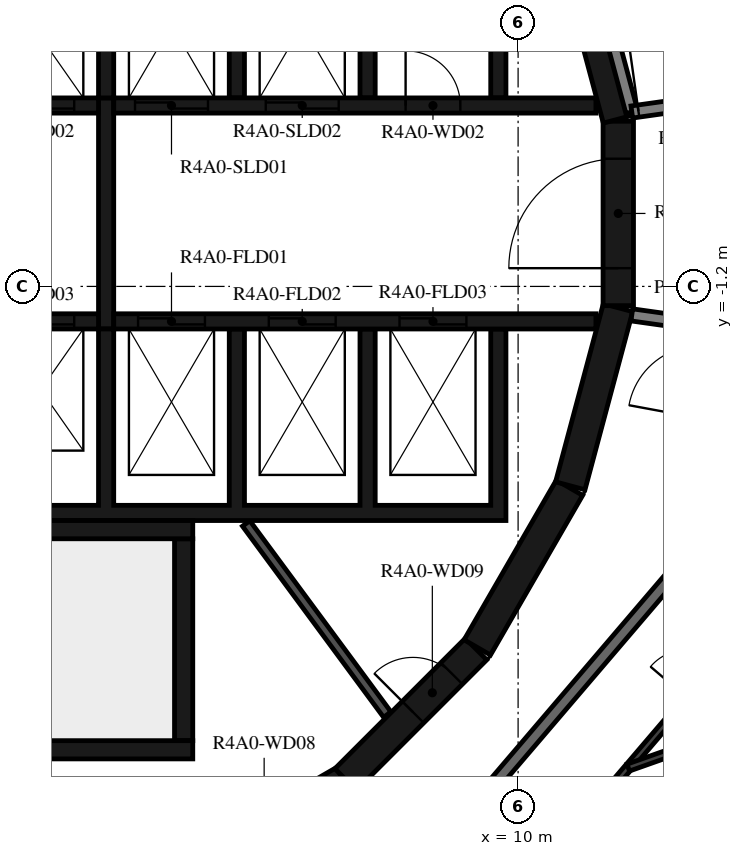
"""IFC4 building model, lengths in metres.
Left out: names, types, materials, properties, quantities, classifications, styles, units other than length and angle.
Written with IfcOpenShell. Run it as: python <this file> out.ifc"""

import sys

from ifc_helpers import new_model, si_unit, direction, frame, frame_2d, origin, place, context, subcontext, project, spatial, polyline, rectangle, outline, extrude, element, fill, save


model = new_model("IFC4")
c1 = context("Model", 3, precision=1e-05, world=origin(), true_north=direction((0.0, 1.0)))
c2 = subcontext(c1, "Body", "Model", "MODEL_VIEW")
j1 = project(units=[si_unit("LENGTHUNIT", "METRE"), si_unit("PLANEANGLEUNIT", "RADIAN")], contexts=[c1])
p1 = place(None, origin())
s1 = spatial("IfcSite", under=j1, at=p1, CompositionType="ELEMENT")
p2 = place(p1, origin())
s2 = spatial("IfcBuilding", under=s1, at=p2, CompositionType="ELEMENT")
p3 = place(p2, frame((0.0, 0.0, 158.7)))
s3 = spatial("IfcBuildingStorey", under=s2, at=p3, CompositionType="ELEMENT", Elevation=158.7)
p4 = place(p3, frame((4.51, -10.845, 0.0), z_axis=(0.0, 0.0, 1.0), x_axis=(0.865975092491, 0.500087131594, 0.0)))
e1 = element("IfcWall", 1, at=p4, inside=s3, PredefinedType="SHEAR", context=c2, shape_type="SweptSolid", body=[
    extrude(rectangle(XDim=3.033, YDim=0.5, at=frame_2d((1.516, 0.0))), origin(), (0.0, 0.0, 1.0), 3.12),
])
p5 = place(p4, frame((1.066, 0.0, 0.0)))
e2 = element("IfcOpeningElement", 2, at=p5, cuts=e1, PredefinedType="OPENING", context=c2, shape_type="SweptSolid", body=[
    extrude(rectangle(XDim=0.9, YDim=2.1, at=frame_2d((0.45, 1.05))), frame((0.0, 0.26, 0.0), z_axis=(0.0, -1.0, 0.0), x_axis=(1.0, 0.0, 0.0)), (0.0, 0.0, 1.0), 0.52),
])
p6 = place(p3, frame((7.164, -9.308, 0.0), z_axis=(0.0, 0.0, 1.0), x_axis=(0.707106781187, 0.707106781187, 0.0)))
e3 = element("IfcWall", 3, at=p6, inside=s3, PredefinedType="SHEAR", context=c2, shape_type="SweptSolid", body=[
    extrude(rectangle(XDim=3.032, YDim=0.5, at=frame_2d((1.516, 0.0))), origin(), (0.0, 0.0, 1.0), 3.12),
])
p7 = place(p6, frame((1.566, 0.0, 0.0)))
e4 = element("IfcOpeningElement", 4, at=p7, cuts=e3, PredefinedType="OPENING", context=c2, shape_type="SweptSolid", body=[
    extrude(rectangle(XDim=0.9, YDim=2.1, at=frame_2d((0.45, 1.05))), frame((0.0, 0.26, 0.0), z_axis=(0.0, -1.0, 0.0), x_axis=(1.0, 0.0, 0.0)), (0.0, 0.0, 1.0), 0.52),
])
for number, where, z_axis, x_axis in (
    (5, (9.329, -7.137, 0.0), (0.0, 0.0, 1.0), (0.5, 0.866, 0.0)),
    (6, (10.858, -4.479, 0.0), (0.0, 0.0, 1.0), (0.259, 0.966, 0.0)),
):
    element("IfcWall", number, at=place(p3, frame(where, z_axis=z_axis, x_axis=x_axis)), inside=s3, PredefinedType="SHEAR", context=c2, shape_type="SweptSolid", body=[
        extrude(rectangle(XDim=3.033, YDim=0.5, at=frame_2d((1.516, 0.0))), origin(), (0.0, 0.0, 1.0), 3.12),
    ])
p8 = place(p3, frame((11.647, -1.516, 0.0), z_axis=(0.0, 0.0, 1.0), x_axis=(0.0, 1.0, 0.0)))
e7 = element("IfcWall", 7, at=p8, inside=s3, PredefinedType="SHEAR", context=c2, shape_type="SweptSolid", body=[
    extrude(rectangle(XDim=3.033, YDim=0.5, at=frame_2d((1.516, 0.0))), origin(), (0.0, 0.0, 1.0), 3.12),
])
p9 = place(p8, frame((0.616, 0.0, 0.0)))
e8 = element("IfcOpeningElement", 8, at=p9, cuts=e7, PredefinedType="OPENING", context=c2, shape_type="SweptSolid", body=[
    extrude(rectangle(XDim=1.8, YDim=2.1, at=frame_2d((0.9, 1.05))), frame((0.0, 0.26, 0.0), z_axis=(0.0, -1.0, 0.0), x_axis=(1.0, 0.0, 0.0)), (0.0, 0.0, 1.0), 0.52),
])
p10 = place(p3, frame((11.643, 1.55, 0.0), z_axis=(0.0, 0.0, 1.0), x_axis=(-0.258734743916, 0.965948410781, 0.0)))
e9 = element("IfcWall", 9, at=p10, inside=s3, PredefinedType="SHEAR", context=c2, shape_type="SweptSolid", body=[
    extrude(rectangle(XDim=3.033, YDim=0.5, at=frame_2d((1.516, 0.0))), origin(), (0.0, 0.0, 1.0), 3.12),
])
p11 = place(p3, frame((-2.4, -5.2, 0.0), z_axis=(0.0, 0.0, 1.0), x_axis=(1.0, 0.0, 0.0)))
e10 = element("IfcWall", 10, at=p11, inside=s3, PredefinedType="SHEAR", context=c2, shape_type="SweptSolid", body=[
    extrude(rectangle(XDim=7.05, YDim=0.3, at=frame_2d((3.525, 0.0))), origin(), (0.0, 0.0, 1.0), 3.12),
])
p12 = place(p3, frame((4.5, -8.67, 0.0), z_axis=(0.0, 0.0, 1.0), x_axis=(0.0, 1.0, 0.0)))
e11 = element("IfcWall", 11, at=p12, inside=s3, PredefinedType="SHEAR", context=c2, shape_type="SweptSolid", body=[
    extrude(rectangle(XDim=3.32, YDim=0.3, at=frame_2d((1.66, 0.0))), origin(), (0.0, 0.0, 1.0), 3.12),
])
p13 = place(p3, frame((0.1, -8.82, 0.0), z_axis=(0.0, 0.0, 1.0), x_axis=(1.0, 0.0, 0.0)))
e12 = element("IfcWall", 12, at=p13, inside=s3, PredefinedType="SHEAR", context=c2, shape_type="SweptSolid", body=[
    extrude(rectangle(XDim=4.55, YDim=0.3, at=frame_2d((2.275, 0.0))), origin(), (0.0, 0.0, 1.0), 3.12),
])
p14 = place(p3, origin())
e13 = element("IfcWall", 13, at=p14, inside=s3, PredefinedType="SHEAR", context=c2, shape_type="SweptSolid", body=[
    extrude(outline(polyline([(-9.55, 4.8), (-1.2, 4.8), (-1.2, 1.9), (-0.95, 1.9), (-0.95, 4.8), (0.95, 4.8), (0.95, 1.9), (1.2, 1.9), (1.2, 4.8), (3.1, 4.8), (3.1, 1.9), (3.35, 1.9), (3.35, 4.8), (5.25, 4.8), (5.25, 1.9), (5.5, 1.9), (5.5, 4.8), (7.4, 4.8), (7.4, 1.9), (7.65, 1.9), (7.65, 4.8), (9.55, 4.8), (9.55, 1.9), (9.8, 1.9), (9.8, 4.8), (9.8, 5.05), (-9.8, 5.05), (-9.8, 4.8), (-9.8, 1.9), (-9.55, 1.9), (-9.55, 4.8)])), origin(), (0.0, 0.0, 1.0), 3.12),
])
p15 = place(p3, origin())
e14 = element("IfcWall", 14, at=p15, inside=s3, PredefinedType="SHEAR", context=c2, shape_type="SweptSolid", body=[
    extrude(outline(polyline([(9.8, -5.05), (9.8, -4.8), (9.8, -1.9), (9.55, -1.9), (9.55, -4.8), (7.65, -4.8), (7.65, -1.9), (7.4, -1.9), (7.4, -4.8), (5.5, -4.8), (5.5, -1.9), (5.25, -1.9), (5.25, -4.8), (3.35, -4.8), (3.35, -1.9), (3.1, -1.9), (3.1, -4.8), (1.2, -4.8), (1.2, -1.9), (0.95, -1.9), (0.95, -4.8), (-0.95, -4.8), (-0.95, -1.9), (-1.2, -1.9), (-1.2, -4.8), (-3.1, -4.8), (-3.1, -1.9), (-3.35, -1.9), (-3.35, -4.8), (-5.25, -4.8), (-5.25, -1.9), (-5.5, -1.9), (-5.5, -4.8), (-7.4, -4.8), (-7.4, -1.9), (-7.65, -1.9), (-7.65, -4.8), (-9.55, -4.8), (-9.55, -1.9), (-9.8, -1.9), (-9.8, -4.8), (-9.8, -5.05), (9.8, -5.05)])), origin(), (0.0, 0.0, 1.0), 3.12),
])
p16 = place(p3, frame((-11.28, 1.775, 0.0), z_axis=(0.0, 0.0, 1.0), x_axis=(1.0, 0.0, 0.0)))
e15 = element("IfcWall", 15, at=p16, inside=s3, PredefinedType="SHEAR", context=c2, shape_type="SweptSolid", body=[
    extrude(rectangle(XDim=14.38, YDim=0.25, at=frame_2d((7.19, 0.0))), origin(), (0.0, 0.0, 1.0), 3.12),
])
p17 = place(p16, frame((10.73, 0.0, 0.0)))
e16 = element("IfcOpeningElement", 16, at=p17, cuts=e15, PredefinedType="OPENING", context=c2, shape_type="SweptSolid", body=[
    extrude(rectangle(XDim=1.1, YDim=2.1, at=frame_2d((0.55, 1.05))), frame((0.0, 0.135, 0.0), z_axis=(0.0, -1.0, 0.0), x_axis=(1.0, 0.0, 0.0)), (0.0, 0.0, 1.0), 0.27),
])
p18 = place(p16, frame((12.88, 0.0, 0.0)))
e17 = element("IfcOpeningElement", 17, at=p18, cuts=e15, PredefinedType="OPENING", context=c2, shape_type="SweptSolid", body=[
    extrude(rectangle(XDim=1.1, YDim=2.1, at=frame_2d((0.55, 1.05))), frame((0.0, 0.135, 0.0), z_axis=(0.0, -1.0, 0.0), x_axis=(1.0, 0.0, 0.0)), (0.0, 0.0, 1.0), 0.27),
])
p19 = place(p16, frame((5.455, 0.0, 0.0)))
e18 = element("IfcOpeningElement", 18, at=p19, cuts=e15, PredefinedType="OPENING", context=c2, shape_type="SweptSolid", body=[
    extrude(rectangle(XDim=0.9, YDim=2.1, at=frame_2d((0.45, 1.05))), frame((0.0, 0.135, 0.0), z_axis=(0.0, -1.0, 0.0), x_axis=(1.0, 0.0, 0.0)), (0.0, 0.0, 1.0), 0.27),
])
p20 = place(p3, frame((3.35, 1.775, 0.0), z_axis=(0.0, 0.0, 1.0), x_axis=(1.0, 0.0, 0.0)))
e19 = element("IfcWall", 19, at=p20, inside=s3, PredefinedType="SHEAR", context=c2, shape_type="SweptSolid", body=[
    extrude(rectangle(XDim=7.93, YDim=0.25, at=frame_2d((3.965, 0.0))), origin(), (0.0, 0.0, 1.0), 3.12),
])
p21 = place(p20, frame((0.35, 0.0, 0.0)))
e20 = element("IfcOpeningElement", 20, at=p21, cuts=e19, PredefinedType="OPENING", context=c2, shape_type="SweptSolid", body=[
    extrude(rectangle(XDim=1.2, YDim=2.4, at=frame_2d((0.6, 1.2))), frame((0.0, 0.135, 0.0), z_axis=(0.0, -1.0, 0.0), x_axis=(1.0, 0.0, 0.0)), (0.0, 0.0, 1.0), 0.27),
])
p22 = place(p20, frame((2.5, 0.0, 0.0)))
e21 = element("IfcOpeningElement", 21, at=p22, cuts=e19, PredefinedType="OPENING", context=c2, shape_type="SweptSolid", body=[
    extrude(rectangle(XDim=1.2, YDim=2.4, at=frame_2d((0.6, 1.2))), frame((0.0, 0.135, 0.0), z_axis=(0.0, -1.0, 0.0), x_axis=(1.0, 0.0, 0.0)), (0.0, 0.0, 1.0), 0.27),
])
p23 = place(p20, frame((4.8, 0.0, 0.0)))
e22 = element("IfcOpeningElement", 22, at=p23, cuts=e19, PredefinedType="OPENING", context=c2, shape_type="SweptSolid", body=[
    extrude(rectangle(XDim=0.9, YDim=2.1, at=frame_2d((0.45, 1.05))), frame((0.0, 0.135, 0.0), z_axis=(0.0, -1.0, 0.0), x_axis=(1.0, 0.0, 0.0)), (0.0, 0.0, 1.0), 0.27),
])
p24 = place(p3, frame((-11.28, -1.775, 0.0), z_axis=(0.0, 0.0, 1.0), x_axis=(1.0, 0.0, 0.0)))
e23 = element("IfcWall", 23, at=p24, inside=s3, PredefinedType="SHEAR", context=c2, shape_type="SweptSolid", body=[
    extrude(rectangle(XDim=14.38, YDim=0.25, at=frame_2d((7.19, 0.0))), origin(), (0.0, 0.0, 1.0), 3.12),
])
p25 = place(p24, frame((2.03, 0.0, 0.0)))
e24 = element("IfcOpeningElement", 24, at=p25, cuts=e23, PredefinedType="OPENING", context=c2, shape_type="SweptSolid", body=[
    extrude(rectangle(XDim=1.3, YDim=2.1, at=frame_2d((0.65, 1.05))), frame((0.0, 0.135, 0.0), z_axis=(0.0, -1.0, 0.0), x_axis=(1.0, 0.0, 0.0)), (0.0, 0.0, 1.0), 0.27),
])
p26 = place(p24, frame((4.18, 0.0, 0.0)))
e25 = element("IfcOpeningElement", 25, at=p26, cuts=e23, PredefinedType="OPENING", context=c2, shape_type="SweptSolid", body=[
    extrude(rectangle(XDim=1.3, YDim=2.1, at=frame_2d((0.65, 1.05))), frame((0.0, 0.135, 0.0), z_axis=(0.0, -1.0, 0.0), x_axis=(1.0, 0.0, 0.0)), (0.0, 0.0, 1.0), 0.27),
])
p27 = place(p24, frame((12.88, 0.0, 0.0)))
e26 = element("IfcOpeningElement", 26, at=p27, cuts=e23, PredefinedType="OPENING", context=c2, shape_type="SweptSolid", body=[
    extrude(rectangle(XDim=1.1, YDim=2.1, at=frame_2d((0.55, 1.05))), frame((0.0, 0.135, 0.0), z_axis=(0.0, -1.0, 0.0), x_axis=(1.0, 0.0, 0.0)), (0.0, 0.0, 1.0), 0.27),
])
p28 = place(p24, frame((6.53, 0.0, 0.0)))
e27 = element("IfcOpeningElement", 27, at=p28, cuts=e23, PredefinedType="OPENING", context=c2, shape_type="SweptSolid", body=[
    extrude(rectangle(XDim=0.9, YDim=2.1, at=frame_2d((0.45, 1.05))), frame((0.0, 0.135, 0.0), z_axis=(0.0, -1.0, 0.0), x_axis=(1.0, 0.0, 0.0)), (0.0, 0.0, 1.0), 0.27),
])
p29 = place(p24, frame((8.68, 0.0, 0.0)))
e28 = element("IfcOpeningElement", 28, at=p29, cuts=e23, PredefinedType="OPENING", context=c2, shape_type="SweptSolid", body=[
    extrude(rectangle(XDim=0.9, YDim=2.1, at=frame_2d((0.45, 1.05))), frame((0.0, 0.135, 0.0), z_axis=(0.0, -1.0, 0.0), x_axis=(1.0, 0.0, 0.0)), (0.0, 0.0, 1.0), 0.27),
])
p30 = place(p24, frame((10.83, 0.0, 0.0)))
e29 = element("IfcOpeningElement", 29, at=p30, cuts=e23, PredefinedType="OPENING", context=c2, shape_type="SweptSolid", body=[
    extrude(rectangle(XDim=0.9, YDim=2.1, at=frame_2d((0.45, 1.05))), frame((0.0, 0.135, 0.0), z_axis=(0.0, -1.0, 0.0), x_axis=(1.0, 0.0, 0.0)), (0.0, 0.0, 1.0), 0.27),
])
p31 = place(p3, frame((3.35, -1.775, 0.0), z_axis=(0.0, 0.0, 1.0), x_axis=(1.0, 0.0, 0.0)))
e30 = element("IfcWall", 30, at=p31, inside=s3, PredefinedType="SHEAR", context=c2, shape_type="SweptSolid", body=[
    extrude(rectangle(XDim=7.93, YDim=0.25, at=frame_2d((3.965, 0.0))), origin(), (0.0, 0.0, 1.0), 3.12),
])
p32 = place(p31, frame((0.4, 0.0, 0.0)))
e31 = element("IfcOpeningElement", 31, at=p32, cuts=e30, PredefinedType="OPENING", context=c2, shape_type="SweptSolid", body=[
    extrude(rectangle(XDim=1.1, YDim=2.4, at=frame_2d((0.55, 1.2))), frame((0.0, 0.135, 0.0), z_axis=(0.0, -1.0, 0.0), x_axis=(1.0, 0.0, 0.0)), (0.0, 0.0, 1.0), 0.27),
])
p33 = place(p31, frame((2.55, 0.0, 0.0)))
e32 = element("IfcOpeningElement", 32, at=p33, cuts=e30, PredefinedType="OPENING", context=c2, shape_type="SweptSolid", body=[
    extrude(rectangle(XDim=1.1, YDim=2.4, at=frame_2d((0.55, 1.2))), frame((0.0, 0.135, 0.0), z_axis=(0.0, -1.0, 0.0), x_axis=(1.0, 0.0, 0.0)), (0.0, 0.0, 1.0), 0.27),
])
p34 = place(p31, frame((4.7, 0.0, 0.0)))
e33 = element("IfcOpeningElement", 33, at=p34, cuts=e30, PredefinedType="OPENING", context=c2, shape_type="SweptSolid", body=[
    extrude(rectangle(XDim=1.1, YDim=2.4, at=frame_2d((0.55, 1.2))), frame((0.0, 0.135, 0.0), z_axis=(0.0, -1.0, 0.0), x_axis=(1.0, 0.0, 0.0)), (0.0, 0.0, 1.0), 0.27),
])
p35 = place(p3, frame((3.225, -1.9, 0.0), z_axis=(0.0, 0.0, 1.0), x_axis=(0.0, 1.0, 0.0)))
e34 = element("IfcWall", 34, at=p35, inside=s3, PredefinedType="SHEAR", context=c2, shape_type="SweptSolid", body=[
    extrude(rectangle(XDim=3.8, YDim=0.25, at=frame_2d((1.9, 0.0))), origin(), (0.0, 0.0, 1.0), 3.12),
])
p36 = place(p3, frame((5.528, -5.098, 0.0), z_axis=(0.0, 0.0, 1.0), x_axis=(0.594034318069, -0.804439698769, 0.0)))
e35 = element("IfcWall", 35, at=p36, inside=s3, PredefinedType="PARTITIONING", context=c2, shape_type="SweptSolid", body=[
    extrude(rectangle(XDim=3.907, YDim=0.15, at=frame_2d((1.953, 0.0))), origin(), (0.0, 0.0, 1.0), 3.12),
])
p37 = place(p3, frame((11.87, 1.668, 0.0), z_axis=(0.0, 0.0, 1.0), x_axis=(-0.258836880648, 0.965921047093, 0.0)))
e36 = element("IfcWall", 36, at=p37, inside=s3, PredefinedType="STANDARD", context=c2, shape_type="SweptSolid", body=[
    extrude(rectangle(XDim=1.695, YDim=0.2, at=frame_2d((0.848, 0.0))), origin(), (0.0, 0.0, 1.0), 3.12),
])
p38 = place(p3, frame((11.87, 1.668, 0.0), z_axis=(0.0, 0.0, 1.0), x_axis=(0.990270910415, 0.139152879904, 0.0)))
e37 = element("IfcWall", 37, at=p38, inside=s3, PredefinedType="STANDARD", context=c2, shape_type="SweptSolid", body=[
    extrude(rectangle(XDim=1.688, YDim=0.2, at=frame_2d((0.844, 0.0))), origin(), (0.0, 0.0, 1.0), 3.12),
])
p39 = place(p38, frame((0.11, 0.0, 0.0)))
e38 = element("IfcOpeningElement", 38, at=p39, cuts=e37, PredefinedType="OPENING", context=c2, shape_type="SweptSolid", body=[
    extrude(rectangle(XDim=1.2, YDim=2.1, at=frame_2d((0.6, 1.05))), frame((0.0, 0.11, 0.0), z_axis=(0.0, -1.0, 0.0), x_axis=(1.0, 0.0, 0.0)), (0.0, 0.0, 1.0), 0.22),
])
p40 = place(p3, frame((13.542, 1.903, 0.0), z_axis=(0.0, 0.0, 1.0), x_axis=(-0.333808508206, 0.942640907159, 0.0)))
e39 = element("IfcWall", 39, at=p40, inside=s3, PredefinedType="STANDARD", context=c2, shape_type="SweptSolid", body=[
    extrude(rectangle(XDim=6.317, YDim=0.2, at=frame_2d((3.158, 0.0))), origin(), (0.0, 0.0, 1.0), 3.12),
])
p41 = place(p3, frame((13.282, -1.867, 0.0), z_axis=(0.0, 0.0, 1.0), x_axis=(-0.990265430288, 0.139191873241, 0.0)))
e40 = element("IfcWall", 40, at=p41, inside=s3, PredefinedType="STANDARD", context=c2, shape_type="SweptSolid", body=[
    extrude(rectangle(XDim=1.426, YDim=0.2, at=frame_2d((0.713, 0.0))), origin(), (0.0, 0.0, 1.0), 3.12),
])
p42 = place(p3, frame((7.858, -11.433, 0.0), z_axis=(0.0, 0.0, 1.0), x_axis=(0.649440801937, 0.760412154545, 0.0)))
e41 = element("IfcWall", 41, at=p42, inside=s3, PredefinedType="STANDARD", context=c2, shape_type="SweptSolid", body=[
    extrude(rectangle(XDim=7.181, YDim=0.2, at=frame_2d((3.59, 0.0))), origin(), (0.0, 0.0, 1.0), 3.12),
])
p43 = place(p3, frame((8.737, -12.713, 0.0), z_axis=(0.0, 0.0, 1.0), x_axis=(0.649430604754, 0.760420863476, 0.0)))
e42 = element("IfcWall", 42, at=p43, inside=s3, PredefinedType="PARTITIONING", context=c2, shape_type="SweptSolid", body=[
    extrude(rectangle(XDim=7.985, YDim=0.12, at=frame_2d((3.992, 0.0))), origin(), (0.0, 0.0, 1.0), 3.12),
])
p44 = place(p43, frame((0.2, 0.0, 0.0)))
e43 = element("IfcOpeningElement", 43, at=p44, cuts=e42, PredefinedType="OPENING", context=c2, shape_type="SweptSolid", body=[
    extrude(rectangle(XDim=0.9, YDim=2.1, at=frame_2d((0.45, 1.05))), frame((0.0, 0.07, 0.0), z_axis=(0.0, -1.0, 0.0), x_axis=(1.0, 0.0, 0.0)), (0.0, 0.0, 1.0), 0.14),
])
p45 = place(p43, frame((6.234, 0.0, 0.0)))
e44 = element("IfcOpeningElement", 44, at=p45, cuts=e42, PredefinedType="OPENING", context=c2, shape_type="SweptSolid", body=[
    extrude(rectangle(XDim=0.8, YDim=2.1, at=frame_2d((0.4, 1.05))), frame((0.0, 0.07, 0.0), z_axis=(0.0, -1.0, 0.0), x_axis=(1.0, 0.0, 0.0)), (0.0, 0.0, 1.0), 0.14),
])
p46 = place(p3, frame((17.198, -7.206, 0.0), z_axis=(0.0, 0.0, 1.0), x_axis=(-0.942639551003, -0.333812337826, 0.0)))
e45 = element("IfcWall", 45, at=p46, inside=s3, PredefinedType="PARTITIONING", context=c2, shape_type="SweptSolid", body=[
    extrude(rectangle(XDim=5.713, YDim=0.12, at=frame_2d((2.857, 0.0))), origin(), (0.0, 0.0, 1.0), 3.12),
])
p47 = place(p9, origin())
e46 = element("IfcDoor", 46, at=p47, inside=s3, OperationType="DOUBLE_DOOR_SINGLE_SWING", PredefinedType="DOOR", context=c2, shape_type="SweptSolid", body=[
    extrude(rectangle(XDim=1.8, YDim=2.1, at=frame_2d((0.9, 1.05))), frame((0.0, 0.025, 0.0), z_axis=(0.0, -1.0, 0.0), x_axis=(1.0, 0.0, 0.0)), (0.0, 0.0, 1.0), 0.05),
])
fill(e8, e46)
p48 = place(p18, origin())
e47 = element("IfcDoor", 47, at=p48, inside=s3, OperationType="DOUBLE_DOOR_SLIDING", PredefinedType="DOOR", context=c2, shape_type="SweptSolid", body=[
    extrude(rectangle(XDim=1.1, YDim=2.1, at=frame_2d((0.55, 1.05))), frame((0.0, 0.025, 0.0), z_axis=(0.0, -1.0, 0.0), x_axis=(1.0, 0.0, 0.0)), (0.0, 0.0, 1.0), 0.05),
])
fill(e17, e47)
p49 = place(p21, origin())
e48 = element("IfcDoor", 48, at=p49, inside=s3, OperationType="DOUBLE_DOOR_SLIDING", PredefinedType="DOOR", context=c2, shape_type="SweptSolid", body=[
    extrude(rectangle(XDim=1.2, YDim=2.4, at=frame_2d((0.6, 1.2))), frame((0.0, 0.025, 0.0), z_axis=(0.0, -1.0, 0.0), x_axis=(1.0, 0.0, 0.0)), (0.0, 0.0, 1.0), 0.05),
])
fill(e20, e48)
p50 = place(p22, origin())
e49 = element("IfcDoor", 49, at=p50, inside=s3, OperationType="DOUBLE_DOOR_SLIDING", PredefinedType="DOOR", context=c2, shape_type="SweptSolid", body=[
    extrude(rectangle(XDim=1.2, YDim=2.4, at=frame_2d((0.6, 1.2))), frame((0.0, 0.025, 0.0), z_axis=(0.0, -1.0, 0.0), x_axis=(1.0, 0.0, 0.0)), (0.0, 0.0, 1.0), 0.05),
])
fill(e21, e49)
p51 = place(p27, origin())
e50 = element("IfcDoor", 50, at=p51, inside=s3, OperationType="DOUBLE_DOOR_SLIDING", PredefinedType="DOOR", context=c2, shape_type="SweptSolid", body=[
    extrude(rectangle(XDim=1.1, YDim=2.1, at=frame_2d((0.55, 1.05))), frame((0.0, 0.025, 0.0), z_axis=(0.0, -1.0, 0.0), x_axis=(1.0, 0.0, 0.0)), (0.0, 0.0, 1.0), 0.05),
])
fill(e26, e50)
p52 = place(p32, origin())
e51 = element("IfcDoor", 51, at=p52, inside=s3, OperationType="DOUBLE_DOOR_SLIDING", PredefinedType="DOOR", context=c2, shape_type="SweptSolid", body=[
    extrude(rectangle(XDim=1.1, YDim=2.4, at=frame_2d((0.55, 1.2))), frame((0.0, 0.025, 0.0), z_axis=(0.0, -1.0, 0.0), x_axis=(1.0, 0.0, 0.0)), (0.0, 0.0, 1.0), 0.05),
])
fill(e31, e51)
p53 = place(p33, origin())
e52 = element("IfcDoor", 52, at=p53, inside=s3, OperationType="DOUBLE_DOOR_SLIDING", PredefinedType="DOOR", context=c2, shape_type="SweptSolid", body=[
    extrude(rectangle(XDim=1.1, YDim=2.4, at=frame_2d((0.55, 1.2))), frame((0.0, 0.025, 0.0), z_axis=(0.0, -1.0, 0.0), x_axis=(1.0, 0.0, 0.0)), (0.0, 0.0, 1.0), 0.05),
])
fill(e32, e52)
p54 = place(p34, origin())
e53 = element("IfcDoor", 53, at=p54, inside=s3, OperationType="DOUBLE_DOOR_SLIDING", PredefinedType="DOOR", context=c2, shape_type="SweptSolid", body=[
    extrude(rectangle(XDim=1.1, YDim=2.4, at=frame_2d((0.55, 1.2))), frame((0.0, 0.025, 0.0), z_axis=(0.0, -1.0, 0.0), x_axis=(1.0, 0.0, 0.0)), (0.0, 0.0, 1.0), 0.05),
])
fill(e33, e53)
p55 = place(p23, origin())
e54 = element("IfcDoor", 54, at=p55, inside=s3, OperationType="SINGLE_SWING_RIGHT", PredefinedType="DOOR", context=c2, shape_type="SweptSolid", body=[
    extrude(rectangle(XDim=0.9, YDim=2.1, at=frame_2d((0.45, 1.05))), frame((0.0, 0.025, 0.0), z_axis=(0.0, -1.0, 0.0), x_axis=(1.0, 0.0, 0.0)), (0.0, 0.0, 1.0), 0.05),
])
fill(e22, e54)
p56 = place(p7, origin())
e55 = element("IfcDoor", 55, at=p56, inside=s3, OperationType="SINGLE_SWING_LEFT", PredefinedType="DOOR", context=c2, shape_type="SweptSolid", body=[
    extrude(rectangle(XDim=0.9, YDim=2.1, at=frame_2d((0.45, 1.05))), frame((0.0, 0.025, 0.0), z_axis=(0.0, -1.0, 0.0), x_axis=(1.0, 0.0, 0.0)), (0.0, 0.0, 1.0), 0.05),
])
fill(e4, e55)
p57 = place(p39, origin())
e56 = element("IfcDoor", 56, at=p57, inside=s3, OperationType="DOUBLE_DOOR_SINGLE_SWING", PredefinedType="DOOR", context=c2, shape_type="SweptSolid", body=[
    extrude(rectangle(XDim=1.2, YDim=2.1, at=frame_2d((0.6, 1.05))), frame((0.0, 0.025, 0.0), z_axis=(0.0, -1.0, 0.0), x_axis=(1.0, 0.0, 0.0)), (0.0, 0.0, 1.0), 0.05),
])
fill(e38, e56)
save(model, sys.argv[1])
